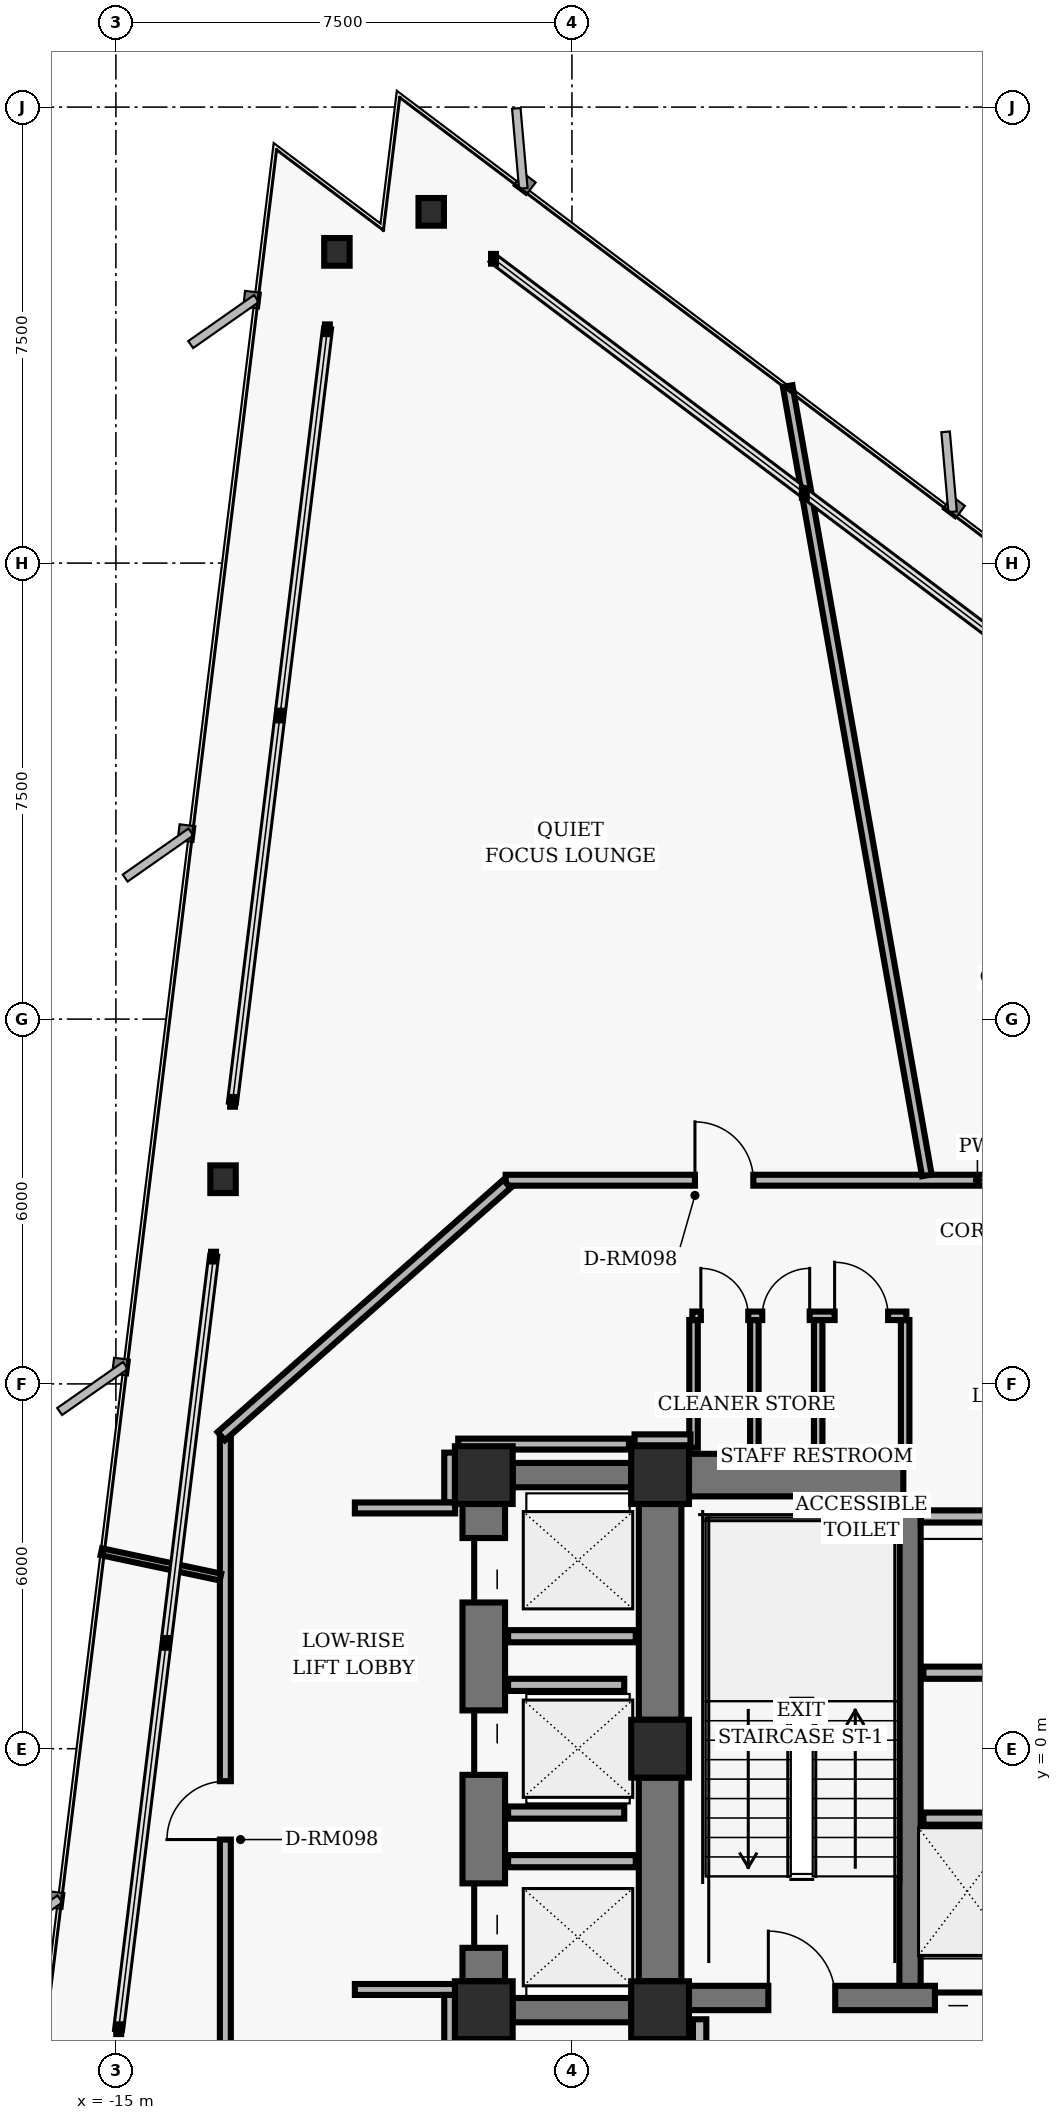
"""IFC4 building model, lengths in metres.
Left out: names, types, materials, properties, quantities, classifications, styles, units other than length and angle.
Written with IfcOpenShell. Run it as: python <this file> out.ifc"""

import sys

from ifc_helpers import new_model, si_unit, direction, frame, frame_2d, origin, origin_2d, place, context, subcontext, project, spatial, rectangle, hollow_rectangle, i_section, extrude, element, fill, save


model = new_model("IFC4")
c1 = context("Model", 3, precision=1e-05, world=origin(), true_north=direction((0.0, 1.0)))
c2 = subcontext(c1, "Body", "Model", "MODEL_VIEW")
j1 = project(units=[si_unit("LENGTHUNIT", "METRE"), si_unit("PLANEANGLEUNIT", "RADIAN")], contexts=[c1])
p1 = place(None, origin())
s1 = spatial("IfcSite", under=j1, at=p1, CompositionType="ELEMENT")
p2 = place(p1, origin())
s2 = spatial("IfcBuilding", under=s1, at=p2, CompositionType="ELEMENT")
p3 = place(p2, frame((0.0, 0.0, 73.12)))
s3 = spatial("IfcBuildingStorey", under=s2, at=p3, CompositionType="ELEMENT", Elevation=73.12)
for number, where, z_axis, x_axis in (
    (1, (-6.05, 4.5, 0.0), (0.0, 0.0, 1.0), (1.0, 0.0, 0.0)),
    (2, (-6.05, 0.0, 0.0), (0.0, 0.0, 1.0), (1.0, 0.0, 0.0)),
    (3, (-6.05, -4.3, 0.0), (0.0, 0.0, 1.0), (1.0, 0.0, 0.0)),
    (4, (-8.95, 4.5, 0.0), (0.0, 0.0, 1.0), (1.0, 0.0, 0.0)),
    (5, (-8.95, -4.3, 0.0), (0.0, 0.0, 1.0), (1.0, 0.0, 0.0)),
):
    element("IfcColumn", number, at=place(p3, frame(where, z_axis=z_axis, x_axis=x_axis)), inside=s3, PredefinedType="COLUMN", context=c2, shape_type="SweptSolid", body=[
        extrude(hollow_rectangle(XDim=0.95, YDim=0.95, WallThickness=0.06, InnerFilletRadius=0.02, OuterFilletRadius=0.04, at=origin_2d()), origin(), (0.0, 0.0, 1.0), 3.36),
    ])
p4 = place(p3, frame((-6.05, 0.475, 0.0), z_axis=(0.0, 0.0, 1.0), x_axis=(0.0, 1.0, 0.0)))
e6 = element("IfcWall", 6, at=p4, inside=s3, PredefinedType="SHEAR", context=c2, shape_type="SweptSolid", body=[
    extrude(rectangle(XDim=3.55, YDim=0.7, at=frame_2d((1.775, 0.0))), origin(), (0.0, 0.0, 1.0), 2.938),
])
p5 = place(p3, frame((-6.05, -3.825, 0.0), z_axis=(0.0, 0.0, 1.0), x_axis=(0.0, 1.0, 0.0)))
e7 = element("IfcWall", 7, at=p5, inside=s3, PredefinedType="SHEAR", context=c2, shape_type="SweptSolid", body=[
    extrude(rectangle(XDim=3.35, YDim=0.7, at=frame_2d((1.675, 0.0))), origin(), (0.0, 0.0, 1.0), 2.938),
])
p6 = place(p3, frame((-1.94, -4.1, 0.0), z_axis=(0.0, 0.0, 1.0), x_axis=(0.0, 1.0, 0.0)))
e8 = element("IfcWall", 8, at=p6, inside=s3, PredefinedType="SHEAR", context=c2, shape_type="SweptSolid", body=[
    extrude(rectangle(XDim=8.2, YDim=0.35, at=frame_2d((4.1, 0.0))), origin(), (0.0, 0.0, 1.0), 2.938),
])
p7 = place(p3, frame((-5.575, -4.1, 0.0), z_axis=(0.0, 0.0, 1.0), x_axis=(1.0, 0.0, 0.0)))
e9 = element("IfcWall", 9, at=p7, inside=s3, PredefinedType="SHEAR", context=c2, shape_type="SweptSolid", body=[
    extrude(rectangle(XDim=11.15, YDim=0.4, at=frame_2d((5.575, 0.0))), origin(), (0.0, 0.0, 1.0), 2.938),
])
p8 = place(p7, frame((1.305, 0.0, 0.0)))
e10 = element("IfcOpeningElement", 10, at=p8, cuts=e9, PredefinedType="OPENING", context=c2, shape_type="SweptSolid", body=[
    extrude(rectangle(XDim=1.1, YDim=2.04, at=frame_2d((0.55, 1.02))), frame((0.0, 0.21, 0.0), z_axis=(0.0, -1.0, 0.0), x_axis=(1.0, 0.0, 0.0)), (0.0, 0.0, 1.0), 0.42),
])
p9 = place(p7, frame((8.745, 0.0, 0.0)))
e11 = element("IfcOpeningElement", 11, at=p9, cuts=e9, PredefinedType="OPENING", context=c2, shape_type="SweptSolid", body=[
    extrude(rectangle(XDim=1.1, YDim=2.04, at=frame_2d((0.55, 1.02))), frame((0.0, 0.21, 0.0), z_axis=(0.0, -1.0, 0.0), x_axis=(1.0, 0.0, 0.0)), (0.0, 0.0, 1.0), 0.42),
])
p10 = place(p7, frame((4.045, 0.0, 0.0)))
e12 = element("IfcOpeningElement", 12, at=p10, cuts=e9, PredefinedType="OPENING", context=c2, shape_type="SweptSolid", body=[
    extrude(rectangle(XDim=1.06, YDim=2.04, at=frame_2d((0.53, 1.02))), frame((0.0, 0.21, 0.0), z_axis=(0.0, -1.0, 0.0), x_axis=(1.0, 0.0, 0.0)), (0.0, 0.0, 1.0), 0.42),
])
p11 = place(p7, frame((6.045, 0.0, 0.0)))
e13 = element("IfcOpeningElement", 13, at=p11, cuts=e9, PredefinedType="OPENING", context=c2, shape_type="SweptSolid", body=[
    extrude(rectangle(XDim=1.06, YDim=2.04, at=frame_2d((0.53, 1.02))), frame((0.0, 0.21, 0.0), z_axis=(0.0, -1.0, 0.0), x_axis=(1.0, 0.0, 0.0)), (0.0, 0.0, 1.0), 0.42),
])
p12 = place(p3, frame((-5.575, 4.5, 0.0), z_axis=(0.0, 0.0, 1.0), x_axis=(1.0, 0.0, 0.0)))
e14 = element("IfcWall", 14, at=p12, inside=s3, PredefinedType="SHEAR", context=c2, shape_type="SweptSolid", body=[
    extrude(rectangle(XDim=3.525, YDim=0.7, at=frame_2d((1.762, 0.0))), origin(), (0.0, 0.0, 1.0), 2.938),
])
p13 = place(p3, frame((-8.95, -3.825, 0.0), z_axis=(0.0, 0.0, 1.0), x_axis=(0.0, 1.0, 0.0)))
e15 = element("IfcWall", 15, at=p13, inside=s3, PredefinedType="SHEAR", context=c2, shape_type="SweptSolid", body=[
    extrude(rectangle(XDim=7.85, YDim=0.7, at=frame_2d((3.925, 0.0))), origin(), (0.0, 0.0, 1.0), 2.938),
])
p14 = place(p13, frame((0.55, 0.0, 0.0)))
e16 = element("IfcOpeningElement", 16, at=p14, cuts=e15, PredefinedType="OPENING", context=c2, shape_type="SweptSolid", body=[
    extrude(rectangle(XDim=1.06, YDim=2.04, at=frame_2d((0.53, 1.02))), frame((0.0, 0.36, 0.0), z_axis=(0.0, -1.0, 0.0), x_axis=(1.0, 0.0, 0.0)), (0.0, 0.0, 1.0), 0.72),
])
p15 = place(p13, frame((3.395, 0.0, 0.0)))
e17 = element("IfcOpeningElement", 17, at=p15, cuts=e15, PredefinedType="OPENING", context=c2, shape_type="SweptSolid", body=[
    extrude(rectangle(XDim=1.06, YDim=2.04, at=frame_2d((0.53, 1.02))), frame((0.0, 0.36, 0.0), z_axis=(0.0, -1.0, 0.0), x_axis=(1.0, 0.0, 0.0)), (0.0, 0.0, 1.0), 0.72),
])
p16 = place(p13, frame((6.23, 0.0, 0.0)))
e18 = element("IfcOpeningElement", 18, at=p16, cuts=e15, PredefinedType="OPENING", context=c2, shape_type="SweptSolid", body=[
    extrude(rectangle(XDim=1.06, YDim=2.04, at=frame_2d((0.53, 1.02))), frame((0.0, 0.36, 0.0), z_axis=(0.0, -1.0, 0.0), x_axis=(1.0, 0.0, 0.0)), (0.0, 0.0, 1.0), 0.72),
])
for number, where, z_axis, x_axis in (
    (19, (-8.475, 4.5, 0.0), (0.0, 0.0, 1.0), (1.0, 0.0, 0.0)),
    (20, (-8.475, -4.3, 0.0), (0.0, 0.0, 1.0), (1.0, 0.0, 0.0)),
):
    element("IfcWall", number, at=place(p3, frame(where, z_axis=z_axis, x_axis=x_axis)), inside=s3, PredefinedType="SHEAR", context=c2, shape_type="SweptSolid", body=[
        extrude(rectangle(XDim=1.95, YDim=0.4, at=frame_2d((0.975, 0.0))), origin(), (0.0, 0.0, 1.0), 2.938),
    ])
for number, where, z_axis, x_axis in (
    (21, (-9.814, 25.277, 0.0), (0.0, 0.0, 1.0), (1.0, 0.0, 0.0)),
    (22, (-11.365, 24.619, 0.0), (0.0, 0.0, 1.0), (1.0, 0.0, 0.0)),
    (23, (-13.238, 9.366, 0.0), (0.0, 0.0, 1.0), (1.0, 0.0, 0.0)),
):
    element("IfcColumn", number, at=place(p3, frame(where, z_axis=z_axis, x_axis=x_axis)), inside=s3, PredefinedType="COLUMN", context=c2, shape_type="SweptSolid", body=[
        extrude(i_section(OverallWidth=0.418, OverallDepth=0.455, WebThickness=0.042, FlangeThickness=0.068, FilletRadius=0.025, at=origin_2d()), origin(), (0.0, 0.0, 1.0), 3.36),
    ])
p17 = place(p3, frame((-1.72, -1.15, 0.0), z_axis=(0.0, 0.0, 1.0), x_axis=(1.0, 0.0, 0.0)))
e24 = element("IfcWall", 24, at=p17, inside=s3, PredefinedType="PARTITIONING", context=c2, shape_type="SweptSolid", body=[
    extrude(rectangle(XDim=3.44, YDim=0.2, at=frame_2d((1.72, 0.0))), origin(), (0.0, 0.0, 1.0), 2.913),
])
p18 = place(p3, frame((-5.4, -7.16, 0.0), z_axis=(0.0, 0.0, 1.0), x_axis=(0.0, 1.0, 0.0)))
e25 = element("IfcWall", 25, at=p18, inside=s3, PredefinedType="PARTITIONING", context=c2, shape_type="SweptSolid", body=[
    extrude(rectangle(XDim=2.71, YDim=0.22, at=frame_2d((1.355, 0.0))), origin(), (0.0, 0.0, 1.0), 2.913),
])
p19 = place(p3, frame((-1.72, 1.25, 0.0), z_axis=(0.0, 0.0, 1.0), x_axis=(1.0, 0.0, 0.0)))
e26 = element("IfcWall", 26, at=p19, inside=s3, PredefinedType="PARTITIONING", context=c2, shape_type="SweptSolid", body=[
    extrude(rectangle(XDim=3.44, YDim=0.2, at=frame_2d((1.72, 0.0))), origin(), (0.0, 0.0, 1.0), 2.913),
])
p20 = place(p3, frame((-1.76, 3.82, 0.0), z_axis=(0.0, 0.0, 1.0), x_axis=(1.0, 0.0, 0.0)))
e27 = element("IfcWall", 27, at=p20, inside=s3, PredefinedType="PARTITIONING", context=c2, shape_type="SweptSolid", body=[
    extrude(rectangle(XDim=3.52, YDim=0.2, at=frame_2d((1.76, 0.0))), origin(), (0.0, 0.0, 1.0), 2.913),
])
for number, where, z_axis, x_axis in (
    (28, (-5.5, 4.95, 0.0), (0.0, 0.0, 1.0), (0.0, 1.0, 0.0)),
    (29, (-4.5, 4.95, 0.0), (0.0, 0.0, 1.0), (0.0, 1.0, 0.0)),
    (30, (-3.45, 4.95, 0.0), (0.0, 0.0, 1.0), (0.0, 1.0, 0.0)),
    (31, (-2.02, 4.95, 0.0), (0.0, 0.0, 1.0), (0.0, 1.0, 0.0)),
):
    element("IfcWall", number, at=place(p3, frame(where, z_axis=z_axis, x_axis=x_axis)), inside=s3, PredefinedType="PARTITIONING", context=c2, shape_type="SweptSolid", body=[
        extrude(rectangle(XDim=2.1, YDim=0.14, at=frame_2d((1.05, 0.0))), origin(), (0.0, 0.0, 1.0), 2.913),
    ])
p21 = place(p3, frame((-5.52, 7.12, 0.0), z_axis=(0.0, 0.0, 1.0), x_axis=(1.0, 0.0, 0.0)))
e32 = element("IfcWall", 32, at=p21, inside=s3, PredefinedType="PARTITIONING", context=c2, shape_type="SweptSolid", body=[
    extrude(rectangle(XDim=3.52, YDim=0.14, at=frame_2d((1.76, 0.0))), origin(), (0.0, 0.0, 1.0), 2.913),
])
p22 = place(p21, frame((0.14, 0.0, 0.0)))
e33 = element("IfcOpeningElement", 33, at=p22, cuts=e32, PredefinedType="OPENING", context=c2, shape_type="SweptSolid", body=[
    extrude(rectangle(XDim=0.78, YDim=2.01, at=frame_2d((0.39, 1.005))), frame((0.0, 0.08, 0.0), z_axis=(0.0, -1.0, 0.0), x_axis=(1.0, 0.0, 0.0)), (0.0, 0.0, 1.0), 0.16),
])
p23 = place(p21, frame((1.15, 0.0, 0.0)))
e34 = element("IfcOpeningElement", 34, at=p23, cuts=e32, PredefinedType="OPENING", context=c2, shape_type="SweptSolid", body=[
    extrude(rectangle(XDim=0.78, YDim=2.01, at=frame_2d((0.39, 1.005))), frame((0.0, 0.08, 0.0), z_axis=(0.0, -1.0, 0.0), x_axis=(1.0, 0.0, 0.0)), (0.0, 0.0, 1.0), 0.16),
])
p24 = place(p21, frame((2.34, 0.0, 0.0)))
e35 = element("IfcOpeningElement", 35, at=p24, cuts=e32, PredefinedType="OPENING", context=c2, shape_type="SweptSolid", body=[
    extrude(rectangle(XDim=0.88, YDim=2.02, at=frame_2d((0.44, 1.01))), frame((0.0, 0.08, 0.0), z_axis=(0.0, -1.0, 0.0), x_axis=(1.0, 0.0, 0.0)), (0.0, 0.0, 1.0), 0.16),
])
for number, where, z_axis, x_axis in (
    (36, (-8.55, -1.85, 0.0), (0.0, 0.0, 1.0), (1.0, 0.0, 0.0)),
    (37, (-8.55, 1.85, 0.0), (0.0, 0.0, 1.0), (1.0, 0.0, 0.0)),
):
    element("IfcWall", number, at=place(p3, frame(where, z_axis=z_axis, x_axis=x_axis)), inside=s3, PredefinedType="PARTITIONING", context=c2, shape_type="SweptSolid", body=[
        extrude(rectangle(XDim=2.1, YDim=0.2, at=frame_2d((1.05, 0.0))), origin(), (0.0, 0.0, 1.0), 2.913),
    ])
for number, where, z_axis, x_axis in (
    (38, (-8.55, -1.05, 0.0), (0.0, 0.0, 1.0), (1.0, 0.0, 0.0)),
    (39, (-8.55, 1.05, 0.0), (0.0, 0.0, 1.0), (1.0, 0.0, 0.0)),
):
    element("IfcWall", number, at=place(p3, frame(where, z_axis=z_axis, x_axis=x_axis)), inside=s3, PredefinedType="PARTITIONING", context=c2, shape_type="SweptSolid", body=[
        extrude(rectangle(XDim=1.91, YDim=0.2, at=frame_2d((0.955, 0.0))), origin(), (0.0, 0.0, 1.0), 2.913),
    ])
p25 = place(p3, frame((-8.59, 9.35, 0.0), z_axis=(0.0, 0.0, 1.0), x_axis=(1.0, 0.0, 0.0)))
e40 = element("IfcWall", 40, at=p25, inside=s3, PredefinedType="PARTITIONING", context=c2, shape_type="SweptSolid", body=[
    extrude(rectangle(XDim=17.18, YDim=0.18, at=frame_2d((8.59, 0.0))), origin(), (0.0, 0.0, 1.0), 2.913),
])
p26 = place(p25, frame((11.444, 0.0, 0.0)))
e41 = element("IfcOpeningElement", 41, at=p26, cuts=e40, PredefinedType="OPENING", context=c2, shape_type="SweptSolid", body=[
    extrude(rectangle(XDim=0.96, YDim=2.02, at=frame_2d((0.48, 1.01))), frame((0.0, 0.1, 0.0), z_axis=(0.0, -1.0, 0.0), x_axis=(1.0, 0.0, 0.0)), (0.0, 0.0, 1.0), 0.2),
])
p27 = place(p25, frame((3.113, 0.0, 0.0)))
e42 = element("IfcOpeningElement", 42, at=p27, cuts=e40, PredefinedType="OPENING", context=c2, shape_type="SweptSolid", body=[
    extrude(rectangle(XDim=0.96, YDim=2.02, at=frame_2d((0.48, 1.01))), frame((0.0, 0.1, 0.0), z_axis=(0.0, -1.0, 0.0), x_axis=(1.0, 0.0, 0.0)), (0.0, 0.0, 1.0), 0.2),
])
p28 = place(p3, frame((-13.2, -5.11, 0.0), z_axis=(0.0, 0.0, 1.0), x_axis=(0.0, 1.0, 0.0)))
e43 = element("IfcWall", 43, at=p28, inside=s3, PredefinedType="PARTITIONING", context=c2, shape_type="SweptSolid", body=[
    extrude(rectangle(XDim=10.22, YDim=0.18, at=frame_2d((5.11, 0.0))), origin(), (0.0, 0.0, 1.0), 2.427),
])
p29 = place(p28, frame((3.616, 0.0, 0.0)))
e44 = element("IfcOpeningElement", 44, at=p29, cuts=e43, PredefinedType="OPENING", context=c2, shape_type="SweptSolid", body=[
    extrude(rectangle(XDim=0.96, YDim=2.02, at=frame_2d((0.48, 1.01))), frame((0.0, 0.1, 0.0), z_axis=(0.0, -1.0, 0.0), x_axis=(1.0, 0.0, 0.0)), (0.0, 0.0, 1.0), 0.2),
])
p30 = place(p3, frame((-13.268, 5.14, 0.0), z_axis=(0.0, 0.0, 1.0), x_axis=(0.749626463267, 0.66186113768, 0.0)))
e45 = element("IfcWall", 45, at=p30, inside=s3, PredefinedType="PARTITIONING", context=c2, shape_type="SweptSolid", body=[
    extrude(rectangle(XDim=6.27, YDim=0.18, at=frame_2d((3.135, 0.0))), origin(), (0.0, 0.0, 1.0), 2.913),
])
p31 = place(p3, frame((-9.51, 4.87, 0.0), z_axis=(0.0, 0.0, 1.0), x_axis=(0.0, -1.0, 0.0)))
e46 = element("IfcWall", 46, at=p31, inside=s3, PredefinedType="PARTITIONING", context=c2, shape_type="SweptSolid", body=[
    extrude(rectangle(XDim=0.82, YDim=0.18, at=frame_2d((0.41, 0.0))), origin(), (0.0, 0.0, 1.0), 2.913),
])
for number, where, z_axis, x_axis in (
    (47, (-9.42, 3.96, 0.0), (0.0, 0.0, 1.0), (-1.0, 0.0, 0.0)),
    (48, (-11.07, -3.96, 0.0), (0.0, 0.0, 1.0), (1.0, 0.0, 0.0)),
):
    element("IfcWall", number, at=place(p3, frame(where, z_axis=z_axis, x_axis=x_axis)), inside=s3, PredefinedType="PARTITIONING", context=c2, shape_type="SweptSolid", body=[
        extrude(rectangle(XDim=1.65, YDim=0.18, at=frame_2d((0.825, 0.0))), origin(), (0.0, 0.0, 1.0), 2.913),
    ])
p32 = place(p3, frame((-9.51, -4.05, 0.0), z_axis=(0.0, 0.0, 1.0), x_axis=(0.0, -1.0, 0.0)))
e49 = element("IfcWall", 49, at=p32, inside=s3, PredefinedType="PARTITIONING", context=c2, shape_type="SweptSolid", body=[
    extrude(rectangle(XDim=0.82, YDim=0.18, at=frame_2d((0.41, 0.0))), origin(), (0.0, 0.0, 1.0), 2.913),
])
p33 = place(p3, frame((-5.55, 5.08, 0.0), z_axis=(0.0, 0.0, 1.0), x_axis=(-1.0, 0.0, 0.0)))
e50 = element("IfcWall", 50, at=p33, inside=s3, PredefinedType="PARTITIONING", context=c2, shape_type="SweptSolid", body=[
    extrude(rectangle(XDim=0.92, YDim=0.18, at=frame_2d((0.46, 0.0))), origin(), (0.0, 0.0, 1.0), 2.913),
])
p34 = place(p3, frame((-6.562, 5.01, 0.0), z_axis=(0.0, 0.0, 1.0), x_axis=(-1.0, 0.0, 0.0)))
e51 = element("IfcWall", 51, at=p34, inside=s3, PredefinedType="PARTITIONING", context=c2, shape_type="SweptSolid", body=[
    extrude(rectangle(XDim=2.808, YDim=0.18, at=frame_2d((1.404, 0.0))), origin(), (0.0, 0.0, 1.0), 2.913),
])
p35 = place(p3, frame((-1.663, 9.43, 0.0), z_axis=(0.0, 0.0, 1.0), x_axis=(-0.17364798238, 0.984807787446, 0.0)))
e52 = element("IfcWall", 52, at=p35, inside=s3, PredefinedType="PARTITIONING", context=c2, shape_type="SweptSolid", body=[
    extrude(rectangle(XDim=13.182, YDim=0.16, at=frame_2d((6.591, 0.0))), origin(), (0.0, 0.0, 1.0), 2.913),
])
p36 = place(p3, frame((-13.28, 2.823, 0.0), z_axis=(0.0, 0.0, 1.0), x_axis=(-0.978147079353, 0.207914143705, 0.0)))
e53 = element("IfcWall", 53, at=p36, inside=s3, PredefinedType="MOVABLE", context=c2, shape_type="SweptSolid", body=[
    extrude(rectangle(XDim=2.003, YDim=0.115, at=frame_2d((1.001, 0.0))), origin(), (0.0, 0.0, 1.0), 2.913),
])
p37 = place(p8, origin())
e54 = element("IfcDoor", 54, at=p37, inside=s3, OperationType="SINGLE_SWING_LEFT", PredefinedType="DOOR", context=c2, shape_type="SweptSolid", body=[
    extrude(rectangle(XDim=1.1, YDim=2.04, at=frame_2d((0.55, 1.02))), frame((0.0, 0.025, 0.0), z_axis=(0.0, -1.0, 0.0), x_axis=(1.0, 0.0, 0.0)), (0.0, 0.0, 1.0), 0.05),
])
fill(e10, e54)
p38 = place(p10, origin())
e55 = element("IfcDoor", 55, at=p38, inside=s3, OperationType="SLIDING_TO_LEFT", PredefinedType="DOOR", context=c2, shape_type="SweptSolid", body=[
    extrude(rectangle(XDim=1.06, YDim=2.04, at=frame_2d((0.53, 1.02))), frame((0.0, 0.025, 0.0), z_axis=(0.0, -1.0, 0.0), x_axis=(1.0, 0.0, 0.0)), (0.0, 0.0, 1.0), 0.05),
])
fill(e12, e55)
p39 = place(p22, origin())
e56 = element("IfcDoor", 56, at=p39, inside=s3, OperationType="SINGLE_SWING_LEFT", PredefinedType="DOOR", context=c2, shape_type="SweptSolid", body=[
    extrude(rectangle(XDim=0.78, YDim=2.01, at=frame_2d((0.39, 1.005))), frame((0.0, 0.025, 0.0), z_axis=(0.0, -1.0, 0.0), x_axis=(1.0, 0.0, 0.0)), (0.0, 0.0, 1.0), 0.05),
])
fill(e33, e56)
p40 = place(p23, origin())
e57 = element("IfcDoor", 57, at=p40, inside=s3, OperationType="SINGLE_SWING_RIGHT", PredefinedType="DOOR", context=c2, shape_type="SweptSolid", body=[
    extrude(rectangle(XDim=0.78, YDim=2.01, at=frame_2d((0.39, 1.005))), frame((0.0, 0.025, 0.0), z_axis=(0.0, -1.0, 0.0), x_axis=(1.0, 0.0, 0.0)), (0.0, 0.0, 1.0), 0.05),
])
fill(e34, e57)
p41 = place(p24, origin())
e58 = element("IfcDoor", 58, at=p41, inside=s3, OperationType="SINGLE_SWING_LEFT", PredefinedType="DOOR", context=c2, shape_type="SweptSolid", body=[
    extrude(rectangle(XDim=0.88, YDim=2.02, at=frame_2d((0.44, 1.01))), frame((0.0, 0.025, 0.0), z_axis=(0.0, -1.0, 0.0), x_axis=(1.0, 0.0, 0.0)), (0.0, 0.0, 1.0), 0.05),
])
fill(e35, e58)
p42 = place(p14, origin())
e59 = element("IfcDoor", 59, at=p42, inside=s3, OperationType="SLIDING_TO_LEFT", PredefinedType="DOOR", context=c2, shape_type="SweptSolid", body=[
    extrude(rectangle(XDim=1.06, YDim=2.04, at=frame_2d((0.53, 1.02))), frame((0.0, 0.025, 0.0), z_axis=(0.0, -1.0, 0.0), x_axis=(1.0, 0.0, 0.0)), (0.0, 0.0, 1.0), 0.05),
])
fill(e16, e59)
p43 = place(p15, origin())
e60 = element("IfcDoor", 60, at=p43, inside=s3, OperationType="SLIDING_TO_RIGHT", PredefinedType="DOOR", context=c2, shape_type="SweptSolid", body=[
    extrude(rectangle(XDim=1.06, YDim=2.04, at=frame_2d((0.53, 1.02))), frame((0.0, 0.025, 0.0), z_axis=(0.0, -1.0, 0.0), x_axis=(1.0, 0.0, 0.0)), (0.0, 0.0, 1.0), 0.05),
])
fill(e17, e60)
p44 = place(p16, origin())
e61 = element("IfcDoor", 61, at=p44, inside=s3, OperationType="SLIDING_TO_LEFT", PredefinedType="DOOR", context=c2, shape_type="SweptSolid", body=[
    extrude(rectangle(XDim=1.06, YDim=2.04, at=frame_2d((0.53, 1.02))), frame((0.0, 0.025, 0.0), z_axis=(0.0, -1.0, 0.0), x_axis=(1.0, 0.0, 0.0)), (0.0, 0.0, 1.0), 0.05),
])
fill(e18, e61)
p45 = place(p29, origin())
e62 = element("IfcDoor", 62, at=p45, inside=s3, OperationType="SINGLE_SWING_LEFT", PredefinedType="DOOR", context=c2, shape_type="SweptSolid", body=[
    extrude(rectangle(XDim=0.96, YDim=2.02, at=frame_2d((0.48, 1.01))), frame((0.0, 0.025, 0.0), z_axis=(0.0, -1.0, 0.0), x_axis=(1.0, 0.0, 0.0)), (0.0, 0.0, 1.0), 0.05),
])
fill(e44, e62)
p46 = place(p27, origin())
e63 = element("IfcDoor", 63, at=p46, inside=s3, OperationType="SINGLE_SWING_LEFT", PredefinedType="DOOR", context=c2, shape_type="SweptSolid", body=[
    extrude(rectangle(XDim=0.96, YDim=2.02, at=frame_2d((0.48, 1.01))), frame((0.0, 0.025, 0.0), z_axis=(0.0, -1.0, 0.0), x_axis=(1.0, 0.0, 0.0)), (0.0, 0.0, 1.0), 0.05),
])
fill(e42, e63)
save(model, sys.argv[1])
